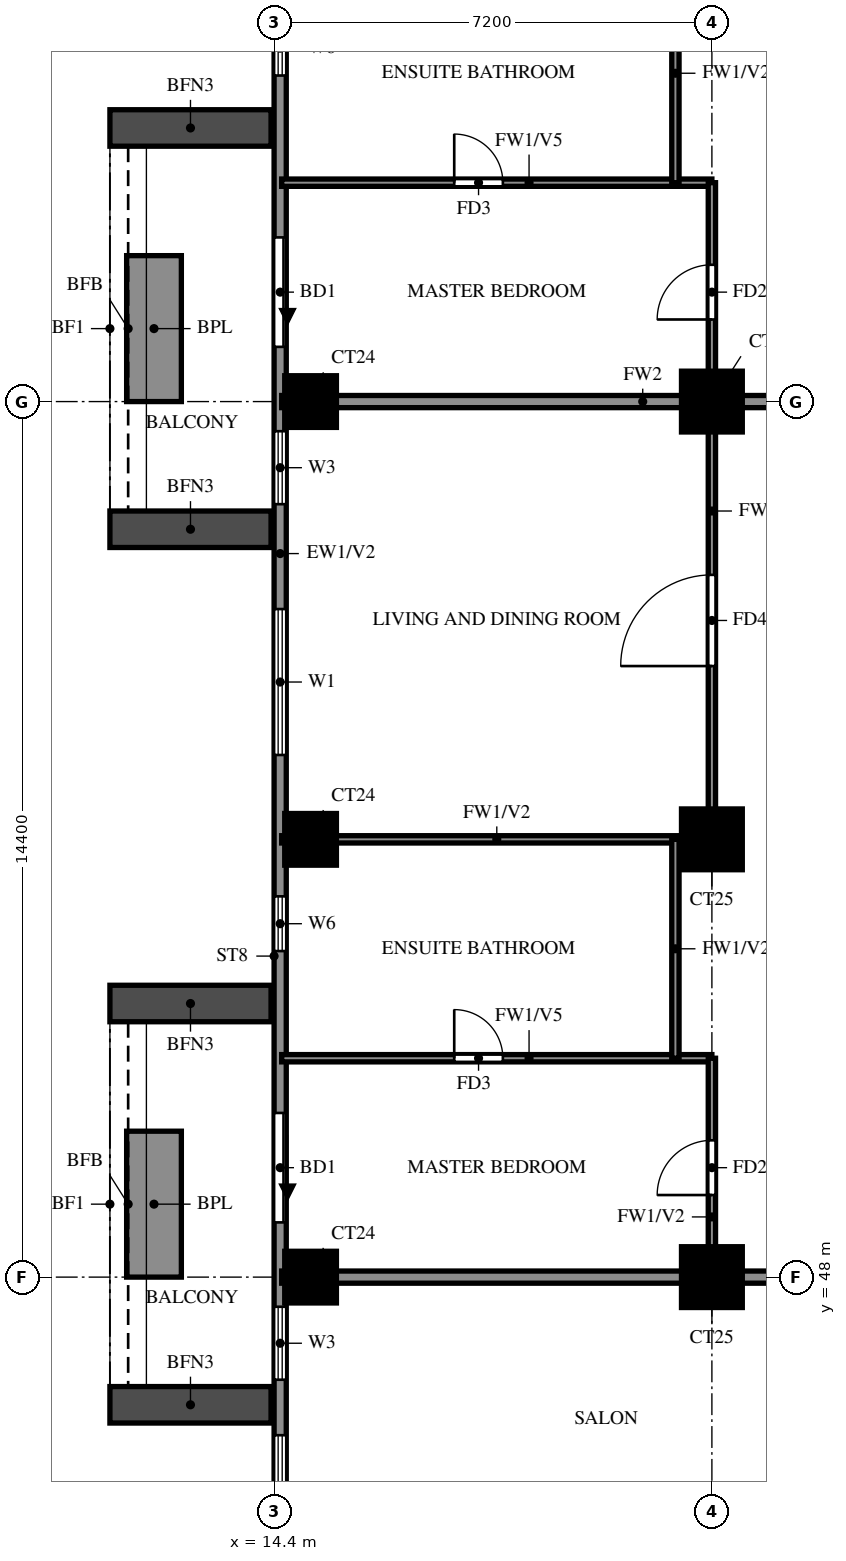
"""IFC4 building model, lengths in metres.
Left out: names, types, materials, properties, quantities, classifications, styles, units other than length and angle.
Written with IfcOpenShell. Run it as: python <this file> out.ifc"""

import sys

from ifc_helpers import new_model, si_unit, direction, frame, frame_2d, origin, origin_2d, place, context, subcontext, project, spatial, rectangle, extrude, source, transform, mapped, element, fill, save


model = new_model("IFC4")
c1 = context("Model", 3, precision=1e-05, world=origin(), true_north=direction((0.0, 1.0)))
c2 = subcontext(c1, "Body", "Model", "MODEL_VIEW")
j1 = project(units=[si_unit("LENGTHUNIT", "METRE"), si_unit("PLANEANGLEUNIT", "RADIAN")], contexts=[c1])
p1 = place(None, origin())
s1 = spatial("IfcSite", under=j1, at=p1, CompositionType="ELEMENT")
p2 = place(p1, origin())
s2 = spatial("IfcBuilding", under=s1, at=p2, CompositionType="ELEMENT")
p3 = place(p2, frame((0.0, 0.0, 171.0)))
s3 = spatial("IfcBuildingStorey", under=s2, at=p3, CompositionType="ELEMENT", Elevation=171.0)
m1 = source(origin(), c2, "Body", "SweptSolid", [
    extrude(rectangle(XDim=0.85, YDim=0.85, at=origin_2d()), origin(), (0.0, 0.0, 1.0), 3.2),
])
p4 = place(p3, frame((15.0, 48.0, 0.0), z_axis=(0.0, 0.0, 1.0), x_axis=(1.0, 0.0, 0.0)))
e1 = element("IfcColumn", 1, at=p4, inside=s3, PredefinedType="COLUMN", context=c2, shape_type="MappedRepresentation", body=[
    mapped(m1, transform((0.0, 0.0, 0.0))),
])
m2 = source(origin(), c2, "Body", "SweptSolid", [
    extrude(rectangle(XDim=1.0, YDim=1.0, at=origin_2d()), origin(), (0.0, 0.0, 1.0), 3.2),
])
p5 = place(p3, frame((21.6, 48.0, 0.0), z_axis=(0.0, 0.0, 1.0), x_axis=(1.0, 0.0, 0.0)))
e2 = element("IfcColumn", 2, at=p5, inside=s3, PredefinedType="COLUMN", context=c2, shape_type="MappedRepresentation", body=[
    mapped(m2, transform((0.0, 0.0, 0.0))),
])
p6 = place(p3, frame((15.0, 55.2, 0.0), z_axis=(0.0, 0.0, 1.0), x_axis=(1.0, 0.0, 0.0)))
e3 = element("IfcColumn", 3, at=p6, inside=s3, PredefinedType="COLUMN", context=c2, shape_type="MappedRepresentation", body=[
    mapped(m1, transform((0.0, 0.0, 0.0))),
])
p7 = place(p3, frame((21.6, 55.2, 0.0), z_axis=(0.0, 0.0, 1.0), x_axis=(1.0, 0.0, 0.0)))
e4 = element("IfcColumn", 4, at=p7, inside=s3, PredefinedType="COLUMN", context=c2, shape_type="MappedRepresentation", body=[
    mapped(m2, transform((0.0, 0.0, 0.0))),
])
p8 = place(p3, frame((15.0, 62.4, 0.0), z_axis=(0.0, 0.0, 1.0), x_axis=(1.0, 0.0, 0.0)))
e5 = element("IfcColumn", 5, at=p8, inside=s3, PredefinedType="COLUMN", context=c2, shape_type="MappedRepresentation", body=[
    mapped(m1, transform((0.0, 0.0, 0.0))),
])
p9 = place(p3, frame((21.6, 62.4, 0.0), z_axis=(0.0, 0.0, 1.0), x_axis=(1.0, 0.0, 0.0)))
e6 = element("IfcColumn", 6, at=p9, inside=s3, PredefinedType="COLUMN", context=c2, shape_type="MappedRepresentation", body=[
    mapped(m2, transform((0.0, 0.0, 0.0))),
])
p10 = place(p3, frame((14.5, 76.6, 0.0), z_axis=(0.0, 0.0, 1.0), x_axis=(0.0, -1.0, 0.0)))
e7 = element("IfcWall", 7, at=p10, inside=s3, PredefinedType="SOLIDWALL", context=c2, shape_type="SweptSolid", body=[
    extrude(rectangle(XDim=33.4, YDim=0.2, at=frame_2d((16.7, 0.0))), origin(), (0.0, 0.0, 1.0), 3.2),
])
p11 = place(p10, frame((11.5, 0.0, 0.0)))
e8 = element("IfcOpeningElement", 8, at=p11, cuts=e7, PredefinedType="OPENING", context=c2, shape_type="SweptSolid", body=[
    extrude(rectangle(XDim=1.8, YDim=2.4, at=frame_2d((0.9, 1.2))), frame((0.0, 0.11, 0.0), z_axis=(0.0, -1.0, 0.0), x_axis=(1.0, 0.0, 0.0)), (0.0, 0.0, 1.0), 0.22),
])
p12 = place(p10, frame((25.9, 0.0, 0.0)))
e9 = element("IfcOpeningElement", 9, at=p12, cuts=e7, PredefinedType="OPENING", context=c2, shape_type="SweptSolid", body=[
    extrude(rectangle(XDim=1.8, YDim=2.4, at=frame_2d((0.9, 1.2))), frame((0.0, 0.11, 0.0), z_axis=(0.0, -1.0, 0.0), x_axis=(1.0, 0.0, 0.0)), (0.0, 0.0, 1.0), 0.22),
])
p13 = place(p10, frame((29.087, 0.0, 0.6)))
e10 = element("IfcOpeningElement", 10, at=p13, cuts=e7, PredefinedType="OPENING", context=c2, shape_type="SweptSolid", body=[
    extrude(rectangle(XDim=1.2, YDim=2.4, at=frame_2d((0.6, 1.2))), frame((0.0, 0.11, 0.0), z_axis=(0.0, -1.0, 0.0), x_axis=(1.0, 0.0, 0.0)), (0.0, 0.0, 1.0), 0.22),
])
p14 = place(p10, frame((31.2, 0.0, 0.6)))
e11 = element("IfcOpeningElement", 11, at=p14, cuts=e7, PredefinedType="OPENING", context=c2, shape_type="SweptSolid", body=[
    extrude(rectangle(XDim=1.8, YDim=2.4, at=frame_2d((0.9, 1.2))), frame((0.0, 0.11, 0.0), z_axis=(0.0, -1.0, 0.0), x_axis=(1.0, 0.0, 0.0)), (0.0, 0.0, 1.0), 0.22),
])
p15 = place(p10, frame((22.337, 0.0, 1.5)))
e12 = element("IfcOpeningElement", 12, at=p15, cuts=e7, PredefinedType="OPENING", context=c2, shape_type="SweptSolid", body=[
    extrude(rectangle(XDim=0.9, YDim=0.9, at=frame_2d((0.45, 0.45))), frame((0.0, 0.11, 0.0), z_axis=(0.0, -1.0, 0.0), x_axis=(1.0, 0.0, 0.0)), (0.0, 0.0, 1.0), 0.22),
])
p16 = place(p10, frame((14.688, 0.0, 0.6)))
e13 = element("IfcOpeningElement", 13, at=p16, cuts=e7, PredefinedType="OPENING", context=c2, shape_type="SweptSolid", body=[
    extrude(rectangle(XDim=1.2, YDim=2.4, at=frame_2d((0.6, 1.2))), frame((0.0, 0.11, 0.0), z_axis=(0.0, -1.0, 0.0), x_axis=(1.0, 0.0, 0.0)), (0.0, 0.0, 1.0), 0.22),
])
p17 = place(p10, frame((17.613, 0.0, 0.6)))
e14 = element("IfcOpeningElement", 14, at=p17, cuts=e7, PredefinedType="OPENING", context=c2, shape_type="SweptSolid", body=[
    extrude(rectangle(XDim=2.4, YDim=2.4, at=frame_2d((1.2, 1.2))), frame((0.0, 0.11, 0.0), z_axis=(0.0, -1.0, 0.0), x_axis=(1.0, 0.0, 0.0)), (0.0, 0.0, 1.0), 0.22),
])
p18 = place(p10, frame((7.938, 0.0, 1.5)))
e15 = element("IfcOpeningElement", 15, at=p18, cuts=e7, PredefinedType="OPENING", context=c2, shape_type="SweptSolid", body=[
    extrude(rectangle(XDim=0.9, YDim=0.9, at=frame_2d((0.45, 0.45))), frame((0.0, 0.11, 0.0), z_axis=(0.0, -1.0, 0.0), x_axis=(1.0, 0.0, 0.0)), (0.0, 0.0, 1.0), 0.22),
])
p19 = place(p10, frame((3.812, 0.0, 0.6)))
e16 = element("IfcOpeningElement", 16, at=p19, cuts=e7, PredefinedType="OPENING", context=c2, shape_type="SweptSolid", body=[
    extrude(rectangle(XDim=2.4, YDim=2.4, at=frame_2d((1.2, 1.2))), frame((0.0, 0.11, 0.0), z_axis=(0.0, -1.0, 0.0), x_axis=(1.0, 0.0, 0.0)), (0.0, 0.0, 1.0), 0.22),
])
p20 = place(p10, frame((0.6, 0.0, 0.6)))
e17 = element("IfcOpeningElement", 17, at=p20, cuts=e7, PredefinedType="OPENING", context=c2, shape_type="SweptSolid", body=[
    extrude(rectangle(XDim=2.4, YDim=2.4, at=frame_2d((1.2, 1.2))), frame((0.0, 0.11, 0.0), z_axis=(0.0, -1.0, 0.0), x_axis=(1.0, 0.0, 0.0)), (0.0, 0.0, 1.0), 0.22),
])
for number, where, z_axis, x_axis in (
    (18, (14.35, 66.9, 0.0), (0.0, 0.0, 1.0), (-1.0, 0.0, 0.0)),
    (19, (14.35, 60.3, 0.0), (0.0, 0.0, 1.0), (-1.0, 0.0, 0.0)),
):
    element("IfcWall", number, at=place(p3, frame(where, z_axis=z_axis, x_axis=x_axis)), inside=s3, PredefinedType="SOLIDWALL", context=c2, shape_type="SweptSolid", body=[
        extrude(rectangle(XDim=2.65, YDim=0.6, at=frame_2d((1.325, 0.0))), origin(), (0.0, 0.0, 1.0), 2.85),
    ])
p21 = place(p3, frame((12.425, 64.8, 0.0), z_axis=(0.0, 0.0, 1.0), x_axis=(0.0, -1.0, 0.0)))
e20 = element("IfcWall", 20, at=p21, inside=s3, PredefinedType="SOLIDWALL", context=c2, shape_type="SweptSolid", body=[
    extrude(rectangle(XDim=2.4, YDim=0.9, at=frame_2d((1.2, 0.0))), origin(), (0.0, 0.0, 1.0), 0.9),
])
for number, where, z_axis, x_axis in (
    (21, (14.35, 52.5, 0.0), (0.0, 0.0, 1.0), (-1.0, 0.0, 0.0)),
    (22, (14.35, 45.9, 0.0), (0.0, 0.0, 1.0), (-1.0, 0.0, 0.0)),
):
    element("IfcWall", number, at=place(p3, frame(where, z_axis=z_axis, x_axis=x_axis)), inside=s3, PredefinedType="SOLIDWALL", context=c2, shape_type="SweptSolid", body=[
        extrude(rectangle(XDim=2.65, YDim=0.6, at=frame_2d((1.325, 0.0))), origin(), (0.0, 0.0, 1.0), 2.85),
    ])
p22 = place(p3, frame((12.425, 50.4, 0.0), z_axis=(0.0, 0.0, 1.0), x_axis=(0.0, -1.0, 0.0)))
e23 = element("IfcWall", 23, at=p22, inside=s3, PredefinedType="SOLIDWALL", context=c2, shape_type="SweptSolid", body=[
    extrude(rectangle(XDim=2.4, YDim=0.9, at=frame_2d((1.2, 0.0))), origin(), (0.0, 0.0, 1.0), 0.9),
])
p23 = place(p3, frame((14.525, 48.0, 0.0), z_axis=(0.0, 0.0, 1.0), x_axis=(1.0, 0.0, 0.0)))
e24 = element("IfcWall", 24, at=p23, inside=s3, PredefinedType="SOLIDWALL", context=c2, shape_type="SweptSolid", body=[
    extrude(rectangle(XDim=19.075, YDim=0.2, at=frame_2d((9.538, 0.0))), origin(), (0.0, 0.0, 1.0), 3.2),
])
p24 = place(p3, frame((14.525, 62.4, 0.0), z_axis=(0.0, 0.0, 1.0), x_axis=(1.0, 0.0, 0.0)))
e25 = element("IfcWall", 25, at=p24, inside=s3, PredefinedType="SOLIDWALL", context=c2, shape_type="SweptSolid", body=[
    extrude(rectangle(XDim=11.875, YDim=0.2, at=frame_2d((5.938, 0.0))), origin(), (0.0, 0.0, 1.0), 3.2),
])
p25 = place(p3, frame((14.525, 51.6, 0.0), z_axis=(0.0, 0.0, 1.0), x_axis=(1.0, 0.0, 0.0)))
e26 = element("IfcWall", 26, at=p25, inside=s3, PredefinedType="PARTITIONING", context=c2, shape_type="SweptSolid", body=[
    extrude(rectangle(XDim=7.075, YDim=0.12, at=frame_2d((3.538, 0.0))), origin(), (0.0, 0.0, 1.0), 2.3),
])
p26 = place(p25, frame((2.837, 0.0, 0.0)))
e27 = element("IfcOpeningElement", 27, at=p26, cuts=e26, PredefinedType="OPENING", context=c2, shape_type="SweptSolid", body=[
    extrude(rectangle(XDim=0.8, YDim=2.1, at=frame_2d((0.4, 1.05))), frame((0.0, 0.07, 0.0), z_axis=(0.0, -1.0, 0.0), x_axis=(1.0, 0.0, 0.0)), (0.0, 0.0, 1.0), 0.14),
])
p27 = place(p3, frame((14.525, 55.2, 0.0), z_axis=(0.0, 0.0, 1.0), x_axis=(1.0, 0.0, 0.0)))
e28 = element("IfcWall", 28, at=p27, inside=s3, PredefinedType="PARTITIONING", context=c2, shape_type="SweptSolid", body=[
    extrude(rectangle(XDim=7.075, YDim=0.12, at=frame_2d((3.538, 0.0))), origin(), (0.0, 0.0, 1.0), 3.2),
])
p28 = place(p3, frame((14.525, 66.0, 0.0), z_axis=(0.0, 0.0, 1.0), x_axis=(1.0, 0.0, 0.0)))
e29 = element("IfcWall", 29, at=p28, inside=s3, PredefinedType="PARTITIONING", context=c2, shape_type="SweptSolid", body=[
    extrude(rectangle(XDim=7.075, YDim=0.12, at=frame_2d((3.538, 0.0))), origin(), (0.0, 0.0, 1.0), 2.3),
])
p29 = place(p28, frame((2.837, 0.0, 0.0)))
e30 = element("IfcOpeningElement", 30, at=p29, cuts=e29, PredefinedType="OPENING", context=c2, shape_type="SweptSolid", body=[
    extrude(rectangle(XDim=0.8, YDim=2.1, at=frame_2d((0.4, 1.05))), frame((0.0, 0.07, 0.0), z_axis=(0.0, -1.0, 0.0), x_axis=(1.0, 0.0, 0.0)), (0.0, 0.0, 1.0), 0.14),
])
p30 = place(p3, frame((21.0, 51.6, 0.0), z_axis=(0.0, 0.0, 1.0), x_axis=(0.0, 1.0, 0.0)))
e31 = element("IfcWall", 31, at=p30, inside=s3, PredefinedType="PARTITIONING", context=c2, shape_type="SweptSolid", body=[
    extrude(rectangle(XDim=3.6, YDim=0.12, at=frame_2d((1.8, 0.0))), origin(), (0.0, 0.0, 1.0), 3.2),
])
p31 = place(p3, frame((21.0, 66.0, 0.0), z_axis=(0.0, 0.0, 1.0), x_axis=(0.0, 1.0, 0.0)))
e32 = element("IfcWall", 32, at=p31, inside=s3, PredefinedType="PARTITIONING", context=c2, shape_type="SweptSolid", body=[
    extrude(rectangle(XDim=3.6, YDim=0.12, at=frame_2d((1.8, 0.0))), origin(), (0.0, 0.0, 1.0), 3.2),
])
p32 = place(p3, frame((21.6, 48.0, 0.0), z_axis=(0.0, 0.0, 1.0), x_axis=(0.0, 1.0, 0.0)))
e33 = element("IfcWall", 33, at=p32, inside=s3, PredefinedType="PARTITIONING", context=c2, shape_type="SweptSolid", body=[
    extrude(rectangle(XDim=3.6, YDim=0.12, at=frame_2d((1.8, 0.0))), origin(), (0.0, 0.0, 1.0), 3.2),
])
p33 = place(p32, frame((1.35, 0.0, 0.0)))
e34 = element("IfcOpeningElement", 34, at=p33, cuts=e33, PredefinedType="OPENING", context=c2, shape_type="SweptSolid", body=[
    extrude(rectangle(XDim=0.9, YDim=2.1, at=frame_2d((0.45, 1.05))), frame((0.0, 0.07, 0.0), z_axis=(0.0, -1.0, 0.0), x_axis=(1.0, 0.0, 0.0)), (0.0, 0.0, 1.0), 0.14),
])
p34 = place(p3, frame((21.6, 55.2, 0.0), z_axis=(0.0, 0.0, 1.0), x_axis=(0.0, 1.0, 0.0)))
e35 = element("IfcWall", 35, at=p34, inside=s3, PredefinedType="PARTITIONING", context=c2, shape_type="SweptSolid", body=[
    extrude(rectangle(XDim=10.8, YDim=0.12, at=frame_2d((5.4, 0.0))), origin(), (0.0, 0.0, 1.0), 3.2),
])
p35 = place(p34, frame((2.85, 0.0, 0.0)))
e36 = element("IfcOpeningElement", 36, at=p35, cuts=e35, PredefinedType="OPENING", context=c2, shape_type="SweptSolid", body=[
    extrude(rectangle(XDim=1.5, YDim=2.1, at=frame_2d((0.75, 1.05))), frame((0.0, 0.07, 0.0), z_axis=(0.0, -1.0, 0.0), x_axis=(1.0, 0.0, 0.0)), (0.0, 0.0, 1.0), 0.14),
])
p36 = place(p34, frame((8.55, 0.0, 0.0)))
e37 = element("IfcOpeningElement", 37, at=p36, cuts=e35, PredefinedType="OPENING", context=c2, shape_type="SweptSolid", body=[
    extrude(rectangle(XDim=0.9, YDim=2.1, at=frame_2d((0.45, 1.05))), frame((0.0, 0.07, 0.0), z_axis=(0.0, -1.0, 0.0), x_axis=(1.0, 0.0, 0.0)), (0.0, 0.0, 1.0), 0.14),
])
p37 = place(p11, origin())
e38 = element("IfcDoor", 38, at=p37, inside=s3, OperationType="DOUBLE_DOOR_SLIDING", PredefinedType="DOOR", context=c2, shape_type="SweptSolid", body=[
    extrude(rectangle(XDim=1.8, YDim=2.4, at=frame_2d((0.9, 1.2))), frame((0.0, 0.025, 0.0), z_axis=(0.0, -1.0, 0.0), x_axis=(1.0, 0.0, 0.0)), (0.0, 0.0, 1.0), 0.05),
])
fill(e8, e38)
p38 = place(p12, origin())
e39 = element("IfcDoor", 39, at=p38, inside=s3, OperationType="DOUBLE_DOOR_SLIDING", PredefinedType="DOOR", context=c2, shape_type="SweptSolid", body=[
    extrude(rectangle(XDim=1.8, YDim=2.4, at=frame_2d((0.9, 1.2))), frame((0.0, 0.025, 0.0), z_axis=(0.0, -1.0, 0.0), x_axis=(1.0, 0.0, 0.0)), (0.0, 0.0, 1.0), 0.05),
])
fill(e9, e39)
p39 = place(p13, origin())
e40 = element("IfcWindow", 40, at=p39, inside=s3, PartitioningType="SINGLE_PANEL", PredefinedType="WINDOW", context=c2, shape_type="SweptSolid", body=[
    extrude(rectangle(XDim=1.2, YDim=2.4, at=frame_2d((0.6, 1.2))), frame((0.0, 0.03, 0.0), z_axis=(0.0, -1.0, 0.0), x_axis=(1.0, 0.0, 0.0)), (0.0, 0.0, 1.0), 0.06),
])
fill(e10, e40)
p40 = place(p14, origin())
e41 = element("IfcWindow", 41, at=p40, inside=s3, PartitioningType="DOUBLE_PANEL_VERTICAL", PredefinedType="WINDOW", context=c2, shape_type="SweptSolid", body=[
    extrude(rectangle(XDim=1.8, YDim=2.4, at=frame_2d((0.9, 1.2))), frame((0.0, 0.03, 0.0), z_axis=(0.0, -1.0, 0.0), x_axis=(1.0, 0.0, 0.0)), (0.0, 0.0, 1.0), 0.06),
])
fill(e11, e41)
p41 = place(p15, origin())
e42 = element("IfcWindow", 42, at=p41, inside=s3, PartitioningType="SINGLE_PANEL", PredefinedType="WINDOW", context=c2, shape_type="SweptSolid", body=[
    extrude(rectangle(XDim=0.9, YDim=0.9, at=frame_2d((0.45, 0.45))), frame((0.0, 0.03, 0.0), z_axis=(0.0, -1.0, 0.0), x_axis=(1.0, 0.0, 0.0)), (0.0, 0.0, 1.0), 0.06),
])
fill(e12, e42)
p42 = place(p16, origin())
e43 = element("IfcWindow", 43, at=p42, inside=s3, PartitioningType="SINGLE_PANEL", PredefinedType="WINDOW", context=c2, shape_type="SweptSolid", body=[
    extrude(rectangle(XDim=1.2, YDim=2.4, at=frame_2d((0.6, 1.2))), frame((0.0, 0.03, 0.0), z_axis=(0.0, -1.0, 0.0), x_axis=(1.0, 0.0, 0.0)), (0.0, 0.0, 1.0), 0.06),
])
fill(e13, e43)
p43 = place(p17, origin())
e44 = element("IfcWindow", 44, at=p43, inside=s3, PartitioningType="DOUBLE_PANEL_VERTICAL", PredefinedType="WINDOW", context=c2, shape_type="SweptSolid", body=[
    extrude(rectangle(XDim=2.4, YDim=2.4, at=frame_2d((1.2, 1.2))), frame((0.0, 0.03, 0.0), z_axis=(0.0, -1.0, 0.0), x_axis=(1.0, 0.0, 0.0)), (0.0, 0.0, 1.0), 0.06),
])
fill(e14, e44)
p44 = place(p18, origin())
e45 = element("IfcWindow", 45, at=p44, inside=s3, PartitioningType="SINGLE_PANEL", PredefinedType="WINDOW", context=c2, shape_type="SweptSolid", body=[
    extrude(rectangle(XDim=0.9, YDim=0.9, at=frame_2d((0.45, 0.45))), frame((0.0, 0.03, 0.0), z_axis=(0.0, -1.0, 0.0), x_axis=(1.0, 0.0, 0.0)), (0.0, 0.0, 1.0), 0.06),
])
fill(e15, e45)
p45 = place(p33, origin())
e46 = element("IfcDoor", 46, at=p45, inside=s3, OperationType="SINGLE_SWING_LEFT", PredefinedType="DOOR", context=c2, shape_type="SweptSolid", body=[
    extrude(rectangle(XDim=0.9, YDim=2.1, at=frame_2d((0.45, 1.05))), frame((0.0, 0.025, 0.0), z_axis=(0.0, -1.0, 0.0), x_axis=(1.0, 0.0, 0.0)), (0.0, 0.0, 1.0), 0.05),
])
fill(e34, e46)
p46 = place(p26, origin())
e47 = element("IfcDoor", 47, at=p46, inside=s3, OperationType="SINGLE_SWING_RIGHT", PredefinedType="DOOR", context=c2, shape_type="SweptSolid", body=[
    extrude(rectangle(XDim=0.8, YDim=2.1, at=frame_2d((0.4, 1.05))), frame((0.0, 0.025, 0.0), z_axis=(0.0, -1.0, 0.0), x_axis=(1.0, 0.0, 0.0)), (0.0, 0.0, 1.0), 0.05),
])
fill(e27, e47)
p47 = place(p35, origin())
e48 = element("IfcDoor", 48, at=p47, inside=s3, OperationType="SINGLE_SWING_LEFT", PredefinedType="DOOR", context=c2, shape_type="SweptSolid", body=[
    extrude(rectangle(XDim=1.5, YDim=2.1, at=frame_2d((0.75, 1.05))), frame((0.0, 0.025, 0.0), z_axis=(0.0, -1.0, 0.0), x_axis=(1.0, 0.0, 0.0)), (0.0, 0.0, 1.0), 0.05),
])
fill(e36, e48)
p48 = place(p36, origin())
e49 = element("IfcDoor", 49, at=p48, inside=s3, OperationType="SINGLE_SWING_LEFT", PredefinedType="DOOR", context=c2, shape_type="SweptSolid", body=[
    extrude(rectangle(XDim=0.9, YDim=2.1, at=frame_2d((0.45, 1.05))), frame((0.0, 0.025, 0.0), z_axis=(0.0, -1.0, 0.0), x_axis=(1.0, 0.0, 0.0)), (0.0, 0.0, 1.0), 0.05),
])
fill(e37, e49)
p49 = place(p29, origin())
e50 = element("IfcDoor", 50, at=p49, inside=s3, OperationType="SINGLE_SWING_RIGHT", PredefinedType="DOOR", context=c2, shape_type="SweptSolid", body=[
    extrude(rectangle(XDim=0.8, YDim=2.1, at=frame_2d((0.4, 1.05))), frame((0.0, 0.025, 0.0), z_axis=(0.0, -1.0, 0.0), x_axis=(1.0, 0.0, 0.0)), (0.0, 0.0, 1.0), 0.05),
])
fill(e30, e50)
save(model, sys.argv[1])
